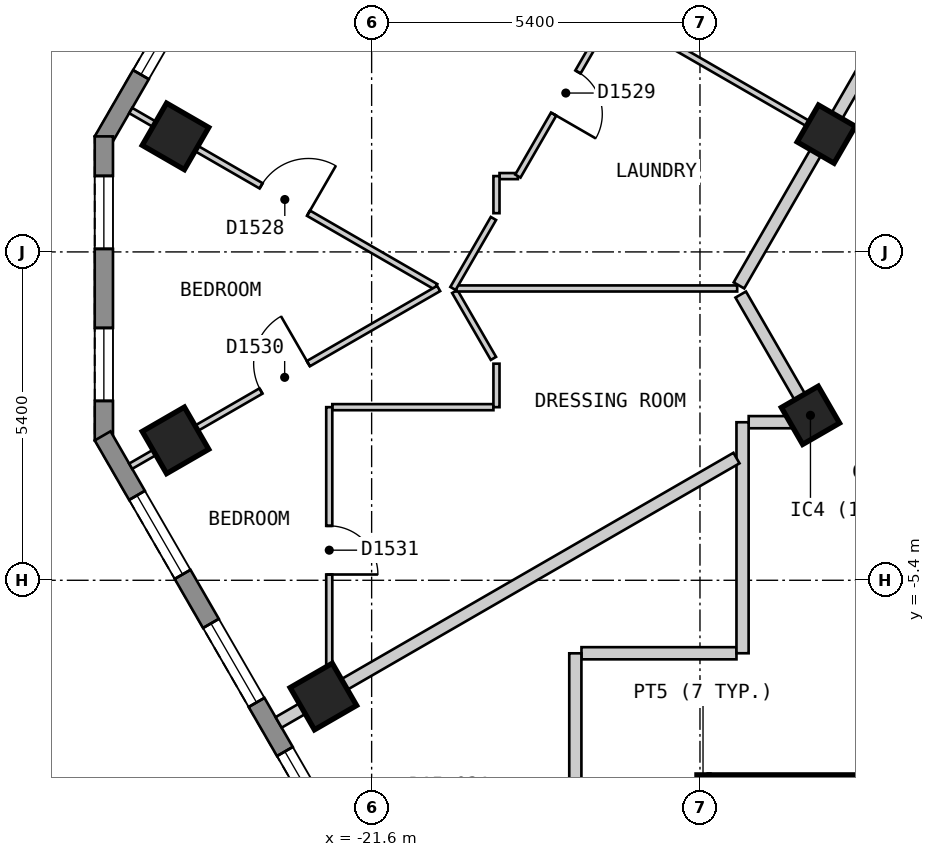
"""IFC4 building model, lengths in metres.
Left out: names, types, materials, properties, quantities, classifications, styles, units other than length and angle.
Written with IfcOpenShell. Run it as: python <this file> out.ifc"""

import sys

from ifc_helpers import new_model, si_unit, direction, frame, frame_2d, origin, origin_2d, place, context, subcontext, project, spatial, polyline, rectangle, outline, extrude, element, fill, save


model = new_model("IFC4")
c1 = context("Model", 3, precision=1e-05, world=origin(), true_north=direction((0.0, 1.0)))
c2 = subcontext(c1, "Body", "Model", "MODEL_VIEW")
j1 = project(units=[si_unit("LENGTHUNIT", "METRE"), si_unit("PLANEANGLEUNIT", "RADIAN")], contexts=[c1])
p1 = place(None, origin())
s1 = spatial("IfcSite", under=j1, at=p1, CompositionType="ELEMENT")
p2 = place(p1, origin())
s2 = spatial("IfcBuilding", under=s1, at=p2, CompositionType="ELEMENT")
p3 = place(p2, frame((0.0, 0.0, 190.2)))
s3 = spatial("IfcBuildingStorey", under=s2, at=p3, CompositionType="ELEMENT", Elevation=190.2)
for number, where, z_axis, x_axis in (
    (1, (-24.826, 1.9, 0.0), (0.0, 0.0, 1.0), (-0.5, -0.866, 0.0)),
    (2, (-24.826, -3.099, 0.0), (0.0, 0.0, 1.0), (0.5, -0.866, 0.0)),
    (3, (-22.394, -7.312, 0.0), (0.0, 0.0, 1.0), (0.5, -0.866, 0.0)),
):
    element("IfcColumn", number, at=place(p3, frame(where, z_axis=z_axis, x_axis=x_axis)), inside=s3, PredefinedType="COLUMN", context=c2, shape_type="SweptSolid", body=[
        extrude(rectangle(XDim=0.8, YDim=0.8, at=origin_2d()), origin(), (0.0, 0.0, 1.0), 3.0),
    ])
for number, where, z_axis, x_axis in (
    (4, (-14.383, -2.687, 0.0), (0.0, 0.0, 1.0), (0.5, -0.866, 0.0)),
    (5, (-14.123, 1.937, 0.0), (0.0, 0.0, 1.0), (-0.5, -0.866, 0.0)),
):
    element("IfcColumn", number, at=place(p3, frame(where, z_axis=z_axis, x_axis=x_axis)), inside=s3, PredefinedType="COLUMN", context=c2, shape_type="SweptSolid", body=[
        extrude(rectangle(XDim=0.7, YDim=0.7, at=origin_2d()), origin(), (0.0, 0.0, 1.0), 3.0),
    ])
p4 = place(p3, frame((-14.592, 21.625, 0.0), z_axis=(0.0, 0.0, 1.0), x_axis=(-0.500010537973, -0.866019319597, 0.0)))
e6 = element("IfcWall", 6, at=p4, inside=s3, PredefinedType="SOLIDWALL", context=c2, shape_type="SweptSolid", body=[
    extrude(outline(polyline([(0.0, -0.15), (22.863, -0.15), (22.783, 0.15), (0.08, 0.15), (0.0, -0.15)])), origin(), (0.0, 0.0, 1.0), 2.7),
])
p5 = place(p4, frame((1.259, 0.0, 0.15)))
e7 = element("IfcOpeningElement", 7, at=p5, cuts=e6, PredefinedType="OPENING", context=c2, shape_type="SweptSolid", body=[
    extrude(rectangle(XDim=1.5, YDim=2.1, at=frame_2d((0.75, 1.05))), frame((0.0, 0.16, 0.0), z_axis=(0.0, -1.0, 0.0), x_axis=(1.0, 0.0, 0.0)), (0.0, 0.0, 1.0), 0.32),
])
p6 = place(p4, frame((3.952, 0.0, 0.15)))
e8 = element("IfcOpeningElement", 8, at=p6, cuts=e6, PredefinedType="OPENING", context=c2, shape_type="SweptSolid", body=[
    extrude(rectangle(XDim=1.5, YDim=2.1, at=frame_2d((0.75, 1.05))), frame((0.0, 0.16, 0.0), z_axis=(0.0, -1.0, 0.0), x_axis=(1.0, 0.0, 0.0)), (0.0, 0.0, 1.0), 0.32),
])
p7 = place(p4, frame((6.644, 0.0, 0.15)))
e9 = element("IfcOpeningElement", 9, at=p7, cuts=e6, PredefinedType="OPENING", context=c2, shape_type="SweptSolid", body=[
    extrude(rectangle(XDim=1.5, YDim=2.1, at=frame_2d((0.75, 1.05))), frame((0.0, 0.16, 0.0), z_axis=(0.0, -1.0, 0.0), x_axis=(1.0, 0.0, 0.0)), (0.0, 0.0, 1.0), 0.32),
])
p8 = place(p4, frame((9.335, 0.0, 0.15)))
e10 = element("IfcOpeningElement", 10, at=p8, cuts=e6, PredefinedType="OPENING", context=c2, shape_type="SweptSolid", body=[
    extrude(rectangle(XDim=1.5, YDim=2.1, at=frame_2d((0.75, 1.05))), frame((0.0, 0.16, 0.0), z_axis=(0.0, -1.0, 0.0), x_axis=(1.0, 0.0, 0.0)), (0.0, 0.0, 1.0), 0.32),
])
p9 = place(p4, frame((12.028, 0.0, 0.15)))
e11 = element("IfcOpeningElement", 11, at=p9, cuts=e6, PredefinedType="OPENING", context=c2, shape_type="SweptSolid", body=[
    extrude(rectangle(XDim=1.5, YDim=2.1, at=frame_2d((0.75, 1.05))), frame((0.0, 0.16, 0.0), z_axis=(0.0, -1.0, 0.0), x_axis=(1.0, 0.0, 0.0)), (0.0, 0.0, 1.0), 0.32),
])
p10 = place(p4, frame((14.72, 0.0, 0.15)))
e12 = element("IfcOpeningElement", 12, at=p10, cuts=e6, PredefinedType="OPENING", context=c2, shape_type="SweptSolid", body=[
    extrude(rectangle(XDim=1.5, YDim=2.1, at=frame_2d((0.75, 1.05))), frame((0.0, 0.16, 0.0), z_axis=(0.0, -1.0, 0.0), x_axis=(1.0, 0.0, 0.0)), (0.0, 0.0, 1.0), 0.32),
])
p11 = place(p4, frame((17.411, 0.0, 0.15)))
e13 = element("IfcOpeningElement", 13, at=p11, cuts=e6, PredefinedType="OPENING", context=c2, shape_type="SweptSolid", body=[
    extrude(rectangle(XDim=1.5, YDim=2.1, at=frame_2d((0.75, 1.05))), frame((0.0, 0.16, 0.0), z_axis=(0.0, -1.0, 0.0), x_axis=(1.0, 0.0, 0.0)), (0.0, 0.0, 1.0), 0.32),
])
p12 = place(p4, frame((20.104, 0.0, 0.15)))
e14 = element("IfcOpeningElement", 14, at=p12, cuts=e6, PredefinedType="OPENING", context=c2, shape_type="SweptSolid", body=[
    extrude(rectangle(XDim=1.5, YDim=2.1, at=frame_2d((0.75, 1.05))), frame((0.0, 0.16, 0.0), z_axis=(0.0, -1.0, 0.0), x_axis=(1.0, 0.0, 0.0)), (0.0, 0.0, 1.0), 0.32),
])
p13 = place(p3, frame((-26.004, 1.9, 0.0), z_axis=(0.0, 0.0, 1.0), x_axis=(0.0, -1.0, 0.0)))
e15 = element("IfcWall", 15, at=p13, inside=s3, PredefinedType="SOLIDWALL", context=c2, shape_type="SweptSolid", body=[
    extrude(outline(polyline([(0.0, -0.15), (5.0, -0.15), (4.92, 0.15), (0.08, 0.15), (0.0, -0.15)])), origin(), (0.0, 0.0, 1.0), 2.7),
])
p14 = place(p13, frame((0.65, 0.0, 0.15)))
e16 = element("IfcOpeningElement", 16, at=p14, cuts=e15, PredefinedType="OPENING", context=c2, shape_type="SweptSolid", body=[
    extrude(rectangle(XDim=1.2, YDim=2.1, at=frame_2d((0.6, 1.05))), frame((0.0, 0.16, 0.0), z_axis=(0.0, -1.0, 0.0), x_axis=(1.0, 0.0, 0.0)), (0.0, 0.0, 1.0), 0.32),
])
p15 = place(p13, frame((3.15, 0.0, 0.15)))
e17 = element("IfcOpeningElement", 17, at=p15, cuts=e15, PredefinedType="OPENING", context=c2, shape_type="SweptSolid", body=[
    extrude(rectangle(XDim=1.2, YDim=2.1, at=frame_2d((0.6, 1.05))), frame((0.0, 0.16, 0.0), z_axis=(0.0, -1.0, 0.0), x_axis=(1.0, 0.0, 0.0)), (0.0, 0.0, 1.0), 0.32),
])
p16 = place(p3, frame((-26.024, -3.025, 0.0), z_axis=(0.0, 0.0, 1.0), x_axis=(0.500018670445, -0.86601462413, 0.0)))
e18 = element("IfcWall", 18, at=p16, inside=s3, PredefinedType="SOLIDWALL", context=c2, shape_type="SweptSolid", body=[
    extrude(outline(polyline([(0.0, -0.15), (20.785, -0.15), (20.705, 0.15), (0.08, 0.15), (0.0, -0.15)])), origin(), (0.0, 0.0, 1.0), 2.7),
])
p17 = place(p16, frame((1.13, 0.0, 0.15)))
e19 = element("IfcOpeningElement", 19, at=p17, cuts=e18, PredefinedType="OPENING", context=c2, shape_type="SweptSolid", body=[
    extrude(rectangle(XDim=1.5, YDim=2.1, at=frame_2d((0.75, 1.05))), frame((0.0, 0.16, 0.0), z_axis=(0.0, -1.0, 0.0), x_axis=(1.0, 0.0, 0.0)), (0.0, 0.0, 1.0), 0.32),
])
p18 = place(p16, frame((3.562, 0.0, 0.15)))
e20 = element("IfcOpeningElement", 20, at=p18, cuts=e18, PredefinedType="OPENING", context=c2, shape_type="SweptSolid", body=[
    extrude(rectangle(XDim=1.5, YDim=2.1, at=frame_2d((0.75, 1.05))), frame((0.0, 0.16, 0.0), z_axis=(0.0, -1.0, 0.0), x_axis=(1.0, 0.0, 0.0)), (0.0, 0.0, 1.0), 0.32),
])
p19 = place(p16, frame((5.994, 0.0, 0.15)))
e21 = element("IfcOpeningElement", 21, at=p19, cuts=e18, PredefinedType="OPENING", context=c2, shape_type="SweptSolid", body=[
    extrude(rectangle(XDim=1.5, YDim=2.1, at=frame_2d((0.75, 1.05))), frame((0.0, 0.16, 0.0), z_axis=(0.0, -1.0, 0.0), x_axis=(1.0, 0.0, 0.0)), (0.0, 0.0, 1.0), 0.32),
])
p20 = place(p16, frame((8.425, 0.0, 0.15)))
e22 = element("IfcOpeningElement", 22, at=p20, cuts=e18, PredefinedType="OPENING", context=c2, shape_type="SweptSolid", body=[
    extrude(rectangle(XDim=1.5, YDim=2.1, at=frame_2d((0.75, 1.05))), frame((0.0, 0.16, 0.0), z_axis=(0.0, -1.0, 0.0), x_axis=(1.0, 0.0, 0.0)), (0.0, 0.0, 1.0), 0.32),
])
p21 = place(p16, frame((10.857, 0.0, 0.15)))
e23 = element("IfcOpeningElement", 23, at=p21, cuts=e18, PredefinedType="OPENING", context=c2, shape_type="SweptSolid", body=[
    extrude(rectangle(XDim=1.5, YDim=2.1, at=frame_2d((0.75, 1.05))), frame((0.0, 0.16, 0.0), z_axis=(0.0, -1.0, 0.0), x_axis=(1.0, 0.0, 0.0)), (0.0, 0.0, 1.0), 0.32),
])
p22 = place(p16, frame((13.289, 0.0, 0.15)))
e24 = element("IfcOpeningElement", 24, at=p22, cuts=e18, PredefinedType="OPENING", context=c2, shape_type="SweptSolid", body=[
    extrude(rectangle(XDim=1.5, YDim=2.1, at=frame_2d((0.75, 1.05))), frame((0.0, 0.16, 0.0), z_axis=(0.0, -1.0, 0.0), x_axis=(1.0, 0.0, 0.0)), (0.0, 0.0, 1.0), 0.32),
])
p23 = place(p16, frame((15.722, 0.0, 0.15)))
e25 = element("IfcOpeningElement", 25, at=p23, cuts=e18, PredefinedType="OPENING", context=c2, shape_type="SweptSolid", body=[
    extrude(rectangle(XDim=1.5, YDim=2.1, at=frame_2d((0.75, 1.05))), frame((0.0, 0.16, 0.0), z_axis=(0.0, -1.0, 0.0), x_axis=(1.0, 0.0, 0.0)), (0.0, 0.0, 1.0), 0.32),
])
p24 = place(p16, frame((18.154, 0.0, 0.15)))
e26 = element("IfcOpeningElement", 26, at=p24, cuts=e18, PredefinedType="OPENING", context=c2, shape_type="SweptSolid", body=[
    extrude(rectangle(XDim=1.5, YDim=2.1, at=frame_2d((0.75, 1.05))), frame((0.0, 0.16, 0.0), z_axis=(0.0, -1.0, 0.0), x_axis=(1.0, 0.0, 0.0)), (0.0, 0.0, 1.0), 0.32),
])
p25 = place(p3, frame((-15.53, -0.701, 0.0), z_axis=(0.0, 0.0, 1.0), x_axis=(0.499972710878, -0.866041158593, 0.0)))
e27 = element("IfcWall", 27, at=p25, inside=s3, PredefinedType="PARTITIONING", context=c2, shape_type="SweptSolid", body=[
    extrude(rectangle(XDim=2.308, YDim=0.2, at=frame_2d((1.154, 0.0))), origin(), (0.0, 0.0, 1.0), 2.7),
])
p26 = place(p3, frame((-18.149, -6.6, 0.0), z_axis=(0.0, 0.0, 1.0), x_axis=(1.0, 0.0, 0.0)))
e28 = element("IfcWall", 28, at=p26, inside=s3, PredefinedType="PARTITIONING", context=c2, shape_type="SweptSolid", body=[
    extrude(rectangle(XDim=2.549, YDim=0.2, at=frame_2d((1.274, 0.0))), origin(), (0.0, 0.0, 1.0), 2.7),
])
p27 = place(p3, frame((-15.399, -2.8, 0.0), z_axis=(0.0, 0.0, 1.0), x_axis=(1.0, 0.0, 0.0)))
e29 = element("IfcWall", 29, at=p27, inside=s3, PredefinedType="PARTITIONING", context=c2, shape_type="SweptSolid", body=[
    extrude(rectangle(XDim=1.081, YDim=0.2, at=frame_2d((0.541, 0.0))), origin(), (0.0, 0.0, 1.0), 2.7),
])
p28 = place(p3, frame((-15.559, -0.551, 0.0), z_axis=(0.0, 0.0, 1.0), x_axis=(0.499964997208, 0.866045611713, 0.0)))
e30 = element("IfcWall", 30, at=p28, inside=s3, PredefinedType="PARTITIONING", context=c2, shape_type="SweptSolid", body=[
    extrude(rectangle(XDim=9.643, YDim=0.2, at=frame_2d((4.821, 0.0))), origin(), (0.0, 0.0, 1.0), 2.7),
])
p29 = place(p28, frame((5.088, 0.0, 0.0)))
e31 = element("IfcOpeningElement", 31, at=p29, cuts=e30, PredefinedType="OPENING", context=c2, shape_type="SweptSolid", body=[
    extrude(rectangle(XDim=1.0, YDim=2.1, at=frame_2d((0.5, 1.05))), frame((0.0, 0.11, 0.0), z_axis=(0.0, -1.0, 0.0), x_axis=(1.0, 0.0, 0.0)), (0.0, 0.0, 1.0), 0.22),
])
p30 = place(p3, frame((-15.5, -6.6, 0.0), z_axis=(0.0, 0.0, 1.0), x_axis=(0.0, 1.0, 0.0)))
e32 = element("IfcWall", 32, at=p30, inside=s3, PredefinedType="PARTITIONING", context=c2, shape_type="SweptSolid", body=[
    extrude(rectangle(XDim=3.799, YDim=0.2, at=frame_2d((1.899, 0.0))), origin(), (0.0, 0.0, 1.0), 2.7),
])
p31 = place(p3, frame((-18.25, -16.152, 0.0), z_axis=(0.0, 0.0, 1.0), x_axis=(0.0, 1.0, 0.0)))
e33 = element("IfcWall", 33, at=p31, inside=s3, PredefinedType="PARTITIONING", context=c2, shape_type="SweptSolid", body=[
    extrude(rectangle(XDim=9.551, YDim=0.2, at=frame_2d((4.775, 0.0))), origin(), (0.0, 0.0, 1.0), 2.7),
])
p32 = place(p31, frame((6.026, 0.0, 0.0)))
e34 = element("IfcOpeningElement", 34, at=p32, cuts=e33, PredefinedType="OPENING", context=c2, shape_type="SweptSolid", body=[
    extrude(rectangle(XDim=0.8, YDim=2.1, at=frame_2d((0.4, 1.05))), frame((0.0, 0.11, 0.0), z_axis=(0.0, -1.0, 0.0), x_axis=(1.0, 0.0, 0.0)), (0.0, 0.0, 1.0), 0.22),
])
p33 = place(p3, frame((-20.233, -0.651, 0.0), z_axis=(0.0, 0.0, 1.0), x_axis=(0.500498449207, -0.865737432679, 0.0)))
e35 = element("IfcWall", 35, at=p33, inside=s3, PredefinedType="PARTITIONING", context=c2, shape_type="SweptSolid", body=[
    extrude(rectangle(XDim=1.271, YDim=0.1, at=frame_2d((0.635, 0.0))), origin(), (0.0, 0.0, 1.0), 2.7),
])
p34 = place(p3, frame((-17.585, 3.936, 0.0), z_axis=(0.0, 0.0, 1.0), x_axis=(0.865979019114, -0.500080332001, 0.0)))
e36 = element("IfcWall", 36, at=p34, inside=s3, PredefinedType="PARTITIONING", context=c2, shape_type="SweptSolid", body=[
    extrude(rectangle(XDim=3.897, YDim=0.1, at=frame_2d((1.949, 0.0))), origin(), (0.0, 0.0, 1.0), 2.7),
])
p35 = place(p3, frame((-25.562, 2.325, 0.0), z_axis=(0.0, 0.0, 1.0), x_axis=(0.86599890761, -0.500045889912, 0.0)))
e37 = element("IfcWall", 37, at=p35, inside=s3, PredefinedType="PARTITIONING", context=c2, shape_type="SweptSolid", body=[
    extrude(rectangle(XDim=5.793, YDim=0.1, at=frame_2d((2.897, 0.0))), origin(), (0.0, 0.0, 1.0), 2.7),
])
p36 = place(p35, frame((2.476, 0.0, 0.0)))
e38 = element("IfcOpeningElement", 38, at=p36, cuts=e37, PredefinedType="OPENING", context=c2, shape_type="SweptSolid", body=[
    extrude(rectangle(XDim=0.9, YDim=2.1, at=frame_2d((0.45, 1.05))), frame((0.0, 0.06, 0.0), z_axis=(0.0, -1.0, 0.0), x_axis=(1.0, 0.0, 0.0)), (0.0, 0.0, 1.0), 0.12),
])
p37 = place(p3, frame((-20.204, -0.601, 0.0), z_axis=(0.0, 0.0, 1.0), x_axis=(1.0, 0.0, 0.0)))
e39 = element("IfcWall", 39, at=p37, inside=s3, PredefinedType="PARTITIONING", context=c2, shape_type="SweptSolid", body=[
    extrude(rectangle(XDim=4.616, YDim=0.1, at=frame_2d((2.308, 0.0))), origin(), (0.0, 0.0, 1.0), 2.7),
])
p38 = place(p3, frame((-22.247, -2.553, 0.0), z_axis=(0.0, 0.0, 1.0), x_axis=(1.0, 0.0, 0.0)))
e40 = element("IfcWall", 40, at=p38, inside=s3, PredefinedType="PARTITIONING", context=c2, shape_type="SweptSolid", body=[
    extrude(rectangle(XDim=2.65, YDim=0.1, at=frame_2d((1.325, 0.0))), origin(), (0.0, 0.0, 1.0), 2.7),
])
p39 = place(p3, frame((-19.497, 1.247, 0.0), z_axis=(0.0, 0.0, 1.0), x_axis=(1.0, 0.0, 0.0)))
e41 = element("IfcWall", 41, at=p39, inside=s3, PredefinedType="PARTITIONING", context=c2, shape_type="SweptSolid", body=[
    extrude(rectangle(XDim=0.302, YDim=0.1, at=frame_2d((0.151, 0.0))), origin(), (0.0, 0.0, 1.0), 2.7),
])
p40 = place(p3, frame((-20.262, -0.601, 0.0), z_axis=(0.0, 0.0, 1.0), x_axis=(0.500247001515, 0.86588275042, 0.0)))
e42 = element("IfcWall", 42, at=p40, inside=s3, PredefinedType="PARTITIONING", context=c2, shape_type="SweptSolid", body=[
    extrude(rectangle(XDim=1.329, YDim=0.1, at=frame_2d((0.665, 0.0))), origin(), (0.0, 0.0, 1.0), 2.7),
])
p41 = place(p3, frame((-19.195, 1.247, 0.0), z_axis=(0.0, 0.0, 1.0), x_axis=(0.499959862915, 0.866048575701, 0.0)))
e43 = element("IfcWall", 43, at=p41, inside=s3, PredefinedType="PARTITIONING", context=c2, shape_type="SweptSolid", body=[
    extrude(rectangle(XDim=7.566, YDim=0.1, at=frame_2d((3.783, 0.0))), origin(), (0.0, 0.0, 1.0), 2.7),
])
p42 = place(p41, frame((5.354, 0.0, 0.0)))
e44 = element("IfcOpeningElement", 44, at=p42, cuts=e43, PredefinedType="OPENING", context=c2, shape_type="SweptSolid", body=[
    extrude(rectangle(XDim=0.9, YDim=2.1, at=frame_2d((0.45, 1.05))), frame((0.0, 0.06, 0.0), z_axis=(0.0, -1.0, 0.0), x_axis=(1.0, 0.0, 0.0)), (0.0, 0.0, 1.0), 0.12),
])
p43 = place(p41, frame((1.177, 0.0, 0.0)))
e45 = element("IfcOpeningElement", 45, at=p43, cuts=e43, PredefinedType="OPENING", context=c2, shape_type="SweptSolid", body=[
    extrude(rectangle(XDim=0.8, YDim=2.1, at=frame_2d((0.4, 1.05))), frame((0.0, 0.06, 0.0), z_axis=(0.0, -1.0, 0.0), x_axis=(1.0, 0.0, 0.0)), (0.0, 0.0, 1.0), 0.12),
])
p44 = place(p3, frame((-19.547, -2.553, 0.0), z_axis=(0.0, 0.0, 1.0), x_axis=(0.0, 1.0, 0.0)))
e46 = element("IfcWall", 46, at=p44, inside=s3, PredefinedType="PARTITIONING", context=c2, shape_type="SweptSolid", body=[
    extrude(rectangle(XDim=0.715, YDim=0.1, at=frame_2d((0.357, 0.0))), origin(), (0.0, 0.0, 1.0), 2.7),
])
p45 = place(p3, frame((-19.547, 0.637, 0.0), z_axis=(0.0, 0.0, 1.0), x_axis=(0.0, 1.0, 0.0)))
e47 = element("IfcWall", 47, at=p45, inside=s3, PredefinedType="PARTITIONING", context=c2, shape_type="SweptSolid", body=[
    extrude(rectangle(XDim=0.61, YDim=0.1, at=frame_2d((0.305, 0.0))), origin(), (0.0, 0.0, 1.0), 2.7),
])
p46 = place(p3, frame((-22.297, -7.141, 0.0), z_axis=(0.0, 0.0, 1.0), x_axis=(0.0, 1.0, 0.0)))
e48 = element("IfcWall", 48, at=p46, inside=s3, PredefinedType="PARTITIONING", context=c2, shape_type="SweptSolid", body=[
    extrude(rectangle(XDim=4.588, YDim=0.1, at=frame_2d((2.294, 0.0))), origin(), (0.0, 0.0, 1.0), 2.7),
])
p47 = place(p46, frame((1.836, 0.0, 0.0)))
e49 = element("IfcOpeningElement", 49, at=p47, cuts=e48, PredefinedType="OPENING", context=c2, shape_type="SweptSolid", body=[
    extrude(rectangle(XDim=0.8, YDim=2.1, at=frame_2d((0.4, 1.05))), frame((0.0, 0.06, 0.0), z_axis=(0.0, -1.0, 0.0), x_axis=(1.0, 0.0, 0.0)), (0.0, 0.0, 1.0), 0.12),
])
p48 = place(p3, frame((-25.563, -3.524, 0.0), z_axis=(0.0, 0.0, 1.0), x_axis=(0.866128586522, 0.499821239653, 0.0)))
e50 = element("IfcWall", 50, at=p48, inside=s3, PredefinedType="PARTITIONING", context=c2, shape_type="SweptSolid", body=[
    extrude(rectangle(XDim=5.848, YDim=0.1, at=frame_2d((2.924, 0.0))), origin(), (0.0, 0.0, 1.0), 2.7),
])
p49 = place(p48, frame((2.474, 0.0, 0.0)))
e51 = element("IfcOpeningElement", 51, at=p49, cuts=e50, PredefinedType="OPENING", context=c2, shape_type="SweptSolid", body=[
    extrude(rectangle(XDim=0.9, YDim=2.1, at=frame_2d((0.45, 1.05))), frame((0.0, 0.06, 0.0), z_axis=(0.0, -1.0, 0.0), x_axis=(1.0, 0.0, 0.0)), (0.0, 0.0, 1.0), 0.12),
])
p50 = place(p3, frame((-23.13, -7.737, 0.0), z_axis=(0.0, 0.0, 1.0), x_axis=(0.866033148899, 0.499986584829, 0.0)))
e52 = element("IfcWall", 52, at=p50, inside=s3, PredefinedType="PARTITIONING", context=c2, shape_type="SweptSolid", body=[
    extrude(rectangle(XDim=8.695, YDim=0.2, at=frame_2d((4.347, 0.0))), origin(), (0.0, 0.0, 1.0), 2.7),
])
p51 = place(p3, frame((-16.15, -14.4, 0.0), z_axis=(0.0, 0.0, 1.0), x_axis=(0.0, 1.0, 0.0)))
e53 = element("IfcWall", 53, at=p51, inside=s3, PredefinedType="SOLIDWALL", context=c2, shape_type="SweptSolid", body=[
    extrude(rectangle(XDim=5.8, YDim=0.2, at=frame_2d((2.9, 0.0))), origin(), (0.0, 0.0, 1.0), 2.7),
])
p52 = place(p3, frame((-16.05, -8.7, 0.0), z_axis=(0.0, 0.0, 1.0), x_axis=(1.0, 0.0, 0.0)))
e54 = element("IfcWall", 54, at=p52, inside=s3, PredefinedType="SOLIDWALL", context=c2, shape_type="SweptSolid", body=[
    extrude(rectangle(XDim=2.75, YDim=0.2, at=frame_2d((1.375, 0.0))), origin(), (0.0, 0.0, 1.0), 2.7),
])
p53 = place(p12, origin())
e55 = element("IfcWindow", 55, at=p53, inside=s3, PartitioningType="SINGLE_PANEL", PredefinedType="WINDOW", context=c2, shape_type="SweptSolid", body=[
    extrude(rectangle(XDim=1.5, YDim=2.1, at=frame_2d((0.75, 1.05))), frame((0.0, 0.03, 0.0), z_axis=(0.0, -1.0, 0.0), x_axis=(1.0, 0.0, 0.0)), (0.0, 0.0, 1.0), 0.06),
])
fill(e14, e55)
p54 = place(p14, origin())
e56 = element("IfcWindow", 56, at=p54, inside=s3, PartitioningType="SINGLE_PANEL", PredefinedType="WINDOW", context=c2, shape_type="SweptSolid", body=[
    extrude(rectangle(XDim=1.2, YDim=2.1, at=frame_2d((0.6, 1.05))), frame((0.0, 0.03, 0.0), z_axis=(0.0, -1.0, 0.0), x_axis=(1.0, 0.0, 0.0)), (0.0, 0.0, 1.0), 0.06),
])
fill(e16, e56)
p55 = place(p15, origin())
e57 = element("IfcWindow", 57, at=p55, inside=s3, PartitioningType="SINGLE_PANEL", PredefinedType="WINDOW", context=c2, shape_type="SweptSolid", body=[
    extrude(rectangle(XDim=1.2, YDim=2.1, at=frame_2d((0.6, 1.05))), frame((0.0, 0.03, 0.0), z_axis=(0.0, -1.0, 0.0), x_axis=(1.0, 0.0, 0.0)), (0.0, 0.0, 1.0), 0.06),
])
fill(e17, e57)
p56 = place(p17, origin())
e58 = element("IfcWindow", 58, at=p56, inside=s3, PartitioningType="SINGLE_PANEL", PredefinedType="WINDOW", context=c2, shape_type="SweptSolid", body=[
    extrude(rectangle(XDim=1.5, YDim=2.1, at=frame_2d((0.75, 1.05))), frame((0.0, 0.03, 0.0), z_axis=(0.0, -1.0, 0.0), x_axis=(1.0, 0.0, 0.0)), (0.0, 0.0, 1.0), 0.06),
])
fill(e19, e58)
p57 = place(p18, origin())
e59 = element("IfcWindow", 59, at=p57, inside=s3, PartitioningType="SINGLE_PANEL", PredefinedType="WINDOW", context=c2, shape_type="SweptSolid", body=[
    extrude(rectangle(XDim=1.5, YDim=2.1, at=frame_2d((0.75, 1.05))), frame((0.0, 0.03, 0.0), z_axis=(0.0, -1.0, 0.0), x_axis=(1.0, 0.0, 0.0)), (0.0, 0.0, 1.0), 0.06),
])
fill(e20, e59)
p58 = place(p19, origin())
e60 = element("IfcWindow", 60, at=p58, inside=s3, PartitioningType="SINGLE_PANEL", PredefinedType="WINDOW", context=c2, shape_type="SweptSolid", body=[
    extrude(rectangle(XDim=1.5, YDim=2.1, at=frame_2d((0.75, 1.05))), frame((0.0, 0.03, 0.0), z_axis=(0.0, -1.0, 0.0), x_axis=(1.0, 0.0, 0.0)), (0.0, 0.0, 1.0), 0.06),
])
fill(e21, e60)
p59 = place(p36, origin())
e61 = element("IfcDoor", 61, at=p59, inside=s3, OperationType="SINGLE_SWING_RIGHT", PredefinedType="DOOR", context=c2, shape_type="SweptSolid", body=[
    extrude(rectangle(XDim=0.9, YDim=2.1, at=frame_2d((0.45, 1.05))), frame((0.0, 0.025, 0.0), z_axis=(0.0, -1.0, 0.0), x_axis=(1.0, 0.0, 0.0)), (0.0, 0.0, 1.0), 0.05),
])
fill(e38, e61)
p60 = place(p43, origin())
e62 = element("IfcDoor", 62, at=p60, inside=s3, OperationType="SINGLE_SWING_LEFT", PredefinedType="DOOR", context=c2, shape_type="SweptSolid", body=[
    extrude(rectangle(XDim=0.8, YDim=2.1, at=frame_2d((0.4, 1.05))), frame((0.0, 0.025, 0.0), z_axis=(0.0, -1.0, 0.0), x_axis=(1.0, 0.0, 0.0)), (0.0, 0.0, 1.0), 0.05),
])
fill(e45, e62)
p61 = place(p49, origin())
e63 = element("IfcDoor", 63, at=p61, inside=s3, OperationType="SINGLE_SWING_RIGHT", PredefinedType="DOOR", context=c2, shape_type="SweptSolid", body=[
    extrude(rectangle(XDim=0.9, YDim=2.1, at=frame_2d((0.45, 1.05))), frame((0.0, 0.025, 0.0), z_axis=(0.0, -1.0, 0.0), x_axis=(1.0, 0.0, 0.0)), (0.0, 0.0, 1.0), 0.05),
])
fill(e51, e63)
p62 = place(p47, origin())
e64 = element("IfcDoor", 64, at=p62, inside=s3, OperationType="SINGLE_SWING_LEFT", PredefinedType="DOOR", context=c2, shape_type="SweptSolid", body=[
    extrude(rectangle(XDim=0.8, YDim=2.1, at=frame_2d((0.4, 1.05))), frame((0.0, 0.025, 0.0), z_axis=(0.0, -1.0, 0.0), x_axis=(1.0, 0.0, 0.0)), (0.0, 0.0, 1.0), 0.05),
])
fill(e49, e64)
save(model, sys.argv[1])
